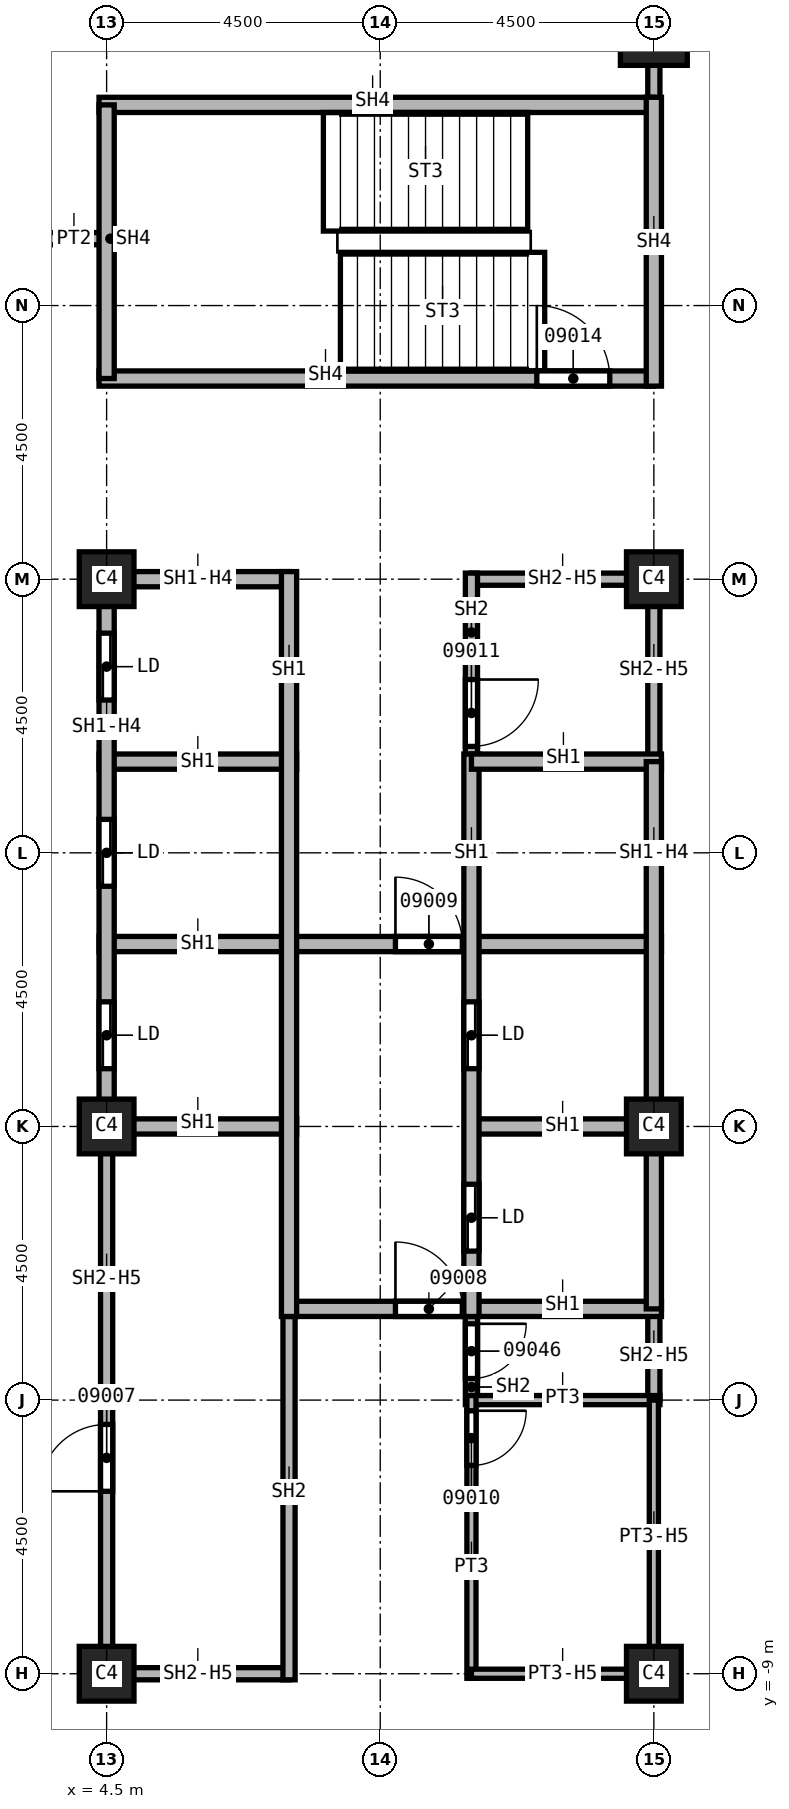
"""IFC4 building model, lengths in metres.
Left out: names, types, materials, properties, quantities, classifications, styles, units other than length and angle.
Written with IfcOpenShell. Run it as: python <this file> out.ifc"""

import sys

from ifc_helpers import new_model, si_unit, direction, frame, frame_2d, origin, origin_2d, place, context, subcontext, project, spatial, rectangle, extrude, element, fill, save


model = new_model("IFC4")
c1 = context("Model", 3, precision=1e-05, world=origin(), true_north=direction((0.0, 1.0)))
c2 = subcontext(c1, "Body", "Model", "MODEL_VIEW")
j1 = project(units=[si_unit("LENGTHUNIT", "METRE"), si_unit("PLANEANGLEUNIT", "RADIAN")], contexts=[c1])
p1 = place(None, origin())
s1 = spatial("IfcSite", under=j1, at=p1, CompositionType="ELEMENT")
p2 = place(p1, origin())
s2 = spatial("IfcBuilding", under=s1, at=p2, CompositionType="ELEMENT")
p3 = place(p2, frame((0.0, 0.0, 166.0)))
s3 = spatial("IfcBuildingStorey", under=s2, at=p3, CompositionType="ELEMENT", Elevation=166.0)
p4 = place(p3, frame((13.5, 18.0, 0.0), z_axis=(0.0, 0.0, 1.0), x_axis=(1.0, 0.0, 0.0)))
e1 = element("IfcColumn", 1, at=p4, inside=s3, PredefinedType="COLUMN", context=c2, shape_type="SweptSolid", body=[
    extrude(rectangle(XDim=1.1, YDim=1.1, at=origin_2d()), origin(), (0.0, 0.0, 1.0), 3.7),
])
for number, where, z_axis, x_axis in (
    (2, (4.5, 0.0, 0.0), (0.0, 0.0, 1.0), (1.0, 0.0, 0.0)),
    (3, (4.5, 9.0, 0.0), (0.0, 0.0, 1.0), (1.0, 0.0, 0.0)),
    (4, (4.5, -9.0, 0.0), (0.0, 0.0, 1.0), (1.0, 0.0, 0.0)),
    (5, (13.5, 0.0, 0.0), (0.0, 0.0, 1.0), (1.0, 0.0, 0.0)),
    (6, (13.5, 9.0, 0.0), (0.0, 0.0, 1.0), (1.0, 0.0, 0.0)),
    (7, (13.5, -9.0, 0.0), (0.0, 0.0, 1.0), (1.0, 0.0, 0.0)),
):
    element("IfcColumn", number, at=place(p3, frame(where, z_axis=z_axis, x_axis=x_axis)), inside=s3, PredefinedType="COLUMN", context=c2, shape_type="SweptSolid", body=[
        extrude(rectangle(XDim=0.9, YDim=0.9, at=origin_2d()), origin(), (0.0, 0.0, 1.0), 3.7),
    ])
p5 = place(p3, frame((3.55, 14.6, 0.0), z_axis=(0.0, 0.0, 1.0), x_axis=(1.0, 0.0, 0.0)))
e8 = element("IfcWall", 8, at=p5, inside=s3, PredefinedType="PARTITIONING", context=c2, shape_type="SweptSolid", body=[
    extrude(rectangle(XDim=0.95, YDim=0.2, at=frame_2d((0.475, 0.0))), origin(), (0.0, 0.0, 1.0), 3.7),
])
p6 = place(p3, frame((13.5, 16.675, 0.0), z_axis=(0.0, 0.0, 1.0), x_axis=(0.0, 1.0, 0.0)))
e9 = element("IfcWall", 9, at=p6, inside=s3, PredefinedType="PARTITIONING", context=c2, shape_type="SweptSolid", body=[
    extrude(rectangle(XDim=6.375, YDim=0.2, at=frame_2d((3.188, 0.0))), origin(), (0.0, 0.0, 1.0), 3.7),
])
p7 = place(p6, frame((4.45, 0.0, 0.0)))
e10 = element("IfcOpeningElement", 10, at=p7, cuts=e9, PredefinedType="OPENING", context=c2, shape_type="SweptSolid", body=[
    extrude(rectangle(XDim=1.0, YDim=2.1, at=frame_2d((0.5, 1.05))), frame((0.0, 0.1, 0.0), z_axis=(0.0, -1.0, 0.0), x_axis=(1.0, 0.0, 0.0)), (0.0, 0.0, 1.0), 0.2),
])
p8 = place(p3, frame((4.5, -9.1, 0.0), z_axis=(0.0, 0.0, 1.0), x_axis=(0.0, 1.0, 0.0)))
e11 = element("IfcWall", 11, at=p8, inside=s3, PredefinedType="SOLIDWALL", context=c2, shape_type="SweptSolid", body=[
    extrude(rectangle(XDim=9.1, YDim=0.2, at=frame_2d((4.55, 0.0))), origin(), (0.0, 0.0, 1.0), 2.938),
])
p9 = place(p8, frame((3.1, 0.0, 0.0)))
e12 = element("IfcOpeningElement", 12, at=p9, cuts=e11, PredefinedType="OPENING", context=c2, shape_type="SweptSolid", body=[
    extrude(rectangle(XDim=1.1, YDim=2.1, at=frame_2d((0.55, 1.05))), frame((0.0, 0.1, 0.0), z_axis=(0.0, -1.0, 0.0), x_axis=(1.0, 0.0, 0.0)), (0.0, 0.0, 1.0), 0.2),
])
p10 = place(p3, frame((7.5, -9.0, 0.0), z_axis=(0.0, 0.0, 1.0), x_axis=(-1.0, 0.0, 0.0)))
e13 = element("IfcWall", 13, at=p10, inside=s3, PredefinedType="SOLIDWALL", context=c2, shape_type="SweptSolid", body=[
    extrude(rectangle(XDim=3.0, YDim=0.2, at=frame_2d((1.5, 0.0))), origin(), (0.0, 0.0, 1.0), 2.938),
])
p11 = place(p3, frame((7.5, -2.875, 0.0), z_axis=(0.0, 0.0, 1.0), x_axis=(0.0, -1.0, 0.0)))
e14 = element("IfcWall", 14, at=p11, inside=s3, PredefinedType="SOLIDWALL", context=c2, shape_type="SweptSolid", body=[
    extrude(rectangle(XDim=6.225, YDim=0.2, at=frame_2d((3.113, 0.0))), origin(), (0.0, 0.0, 1.0), 3.7),
])
p12 = place(p3, frame((10.5, -2.875, 0.0), z_axis=(0.0, 0.0, 1.0), x_axis=(0.0, -1.0, 0.0)))
e15 = element("IfcWall", 15, at=p12, inside=s3, PredefinedType="SOLIDWALL", context=c2, shape_type="SweptSolid", body=[
    extrude(rectangle(XDim=1.7, YDim=0.2, at=frame_2d((0.85, 0.0))), origin(), (0.0, 0.0, 1.0), 3.7),
])
p13 = place(p12, frame((0.37, 0.0, 0.0)))
e16 = element("IfcOpeningElement", 16, at=p13, cuts=e15, PredefinedType="OPENING", context=c2, shape_type="SweptSolid", body=[
    extrude(rectangle(XDim=0.9, YDim=2.1, at=frame_2d((0.45, 1.05))), frame((0.0, 0.1, 0.0), z_axis=(0.0, -1.0, 0.0), x_axis=(1.0, 0.0, 0.0)), (0.0, 0.0, 1.0), 0.2),
])
p14 = place(p3, frame((10.5, 9.0, 0.0), z_axis=(0.0, 0.0, 1.0), x_axis=(1.0, 0.0, 0.0)))
e17 = element("IfcWall", 17, at=p14, inside=s3, PredefinedType="SOLIDWALL", context=c2, shape_type="SweptSolid", body=[
    extrude(rectangle(XDim=3.0, YDim=0.2, at=frame_2d((1.5, 0.0))), origin(), (0.0, 0.0, 1.0), 2.938),
])
p15 = place(p3, frame((10.5, 9.1, 0.0), z_axis=(0.0, 0.0, 1.0), x_axis=(0.0, -1.0, 0.0)))
e18 = element("IfcWall", 18, at=p15, inside=s3, PredefinedType="SOLIDWALL", context=c2, shape_type="SweptSolid", body=[
    extrude(rectangle(XDim=3.225, YDim=0.2, at=frame_2d((1.613, 0.0))), origin(), (0.0, 0.0, 1.0), 3.7),
])
p16 = place(p15, frame((1.75, 0.0, 0.0)))
e19 = element("IfcOpeningElement", 19, at=p16, cuts=e18, PredefinedType="OPENING", context=c2, shape_type="SweptSolid", body=[
    extrude(rectangle(XDim=1.1, YDim=2.1, at=frame_2d((0.55, 1.05))), frame((0.0, 0.1, 0.0), z_axis=(0.0, -1.0, 0.0), x_axis=(1.0, 0.0, 0.0)), (0.0, 0.0, 1.0), 0.2),
])
p17 = place(p3, frame((13.5, -3.0, 0.0), z_axis=(0.0, 0.0, 1.0), x_axis=(0.0, -1.0, 0.0)))
e20 = element("IfcWall", 20, at=p17, inside=s3, PredefinedType="SOLIDWALL", context=c2, shape_type="SweptSolid", body=[
    extrude(rectangle(XDim=1.5, YDim=0.2, at=frame_2d((0.75, 0.0))), origin(), (0.0, 0.0, 1.0), 2.938),
])
p18 = place(p3, frame((13.5, 9.1, 0.0), z_axis=(0.0, 0.0, 1.0), x_axis=(0.0, -1.0, 0.0)))
e21 = element("IfcWall", 21, at=p18, inside=s3, PredefinedType="SOLIDWALL", context=c2, shape_type="SweptSolid", body=[
    extrude(rectangle(XDim=3.1, YDim=0.2, at=frame_2d((1.55, 0.0))), origin(), (0.0, 0.0, 1.0), 2.938),
])
p19 = place(p3, frame((4.375, 0.0, 0.0), z_axis=(0.0, 0.0, 1.0), x_axis=(1.0, 0.0, 0.0)))
e22 = element("IfcWall", 22, at=p19, inside=s3, PredefinedType="SOLIDWALL", context=c2, shape_type="SweptSolid", body=[
    extrude(rectangle(XDim=3.25, YDim=0.25, at=frame_2d((1.625, 0.0))), origin(), (0.0, 0.0, 1.0), 3.7),
])
p20 = place(p3, frame((4.375, 3.0, 0.0), z_axis=(0.0, 0.0, 1.0), x_axis=(1.0, 0.0, 0.0)))
e23 = element("IfcWall", 23, at=p20, inside=s3, PredefinedType="SOLIDWALL", context=c2, shape_type="SweptSolid", body=[
    extrude(rectangle(XDim=9.25, YDim=0.25, at=frame_2d((4.625, 0.0))), origin(), (0.0, 0.0, 1.0), 3.7),
])
p21 = place(p20, frame((4.875, 0.0, 0.0)))
e24 = element("IfcOpeningElement", 24, at=p21, cuts=e23, PredefinedType="OPENING", context=c2, shape_type="SweptSolid", body=[
    extrude(rectangle(XDim=1.1, YDim=2.1, at=frame_2d((0.55, 1.05))), frame((0.0, 0.125, 0.0), z_axis=(0.0, -1.0, 0.0), x_axis=(1.0, 0.0, 0.0)), (0.0, 0.0, 1.0), 0.25),
])
p22 = place(p3, frame((4.375, 6.0, 0.0), z_axis=(0.0, 0.0, 1.0), x_axis=(1.0, 0.0, 0.0)))
e25 = element("IfcWall", 25, at=p22, inside=s3, PredefinedType="SOLIDWALL", context=c2, shape_type="SweptSolid", body=[
    extrude(rectangle(XDim=3.25, YDim=0.25, at=frame_2d((1.625, 0.0))), origin(), (0.0, 0.0, 1.0), 3.7),
])
p23 = place(p3, frame((4.5, 0.0, 0.0), z_axis=(0.0, 0.0, 1.0), x_axis=(0.0, 1.0, 0.0)))
e26 = element("IfcWall", 26, at=p23, inside=s3, PredefinedType="SOLIDWALL", context=c2, shape_type="SweptSolid", body=[
    extrude(rectangle(XDim=9.125, YDim=0.25, at=frame_2d((4.562, 0.0))), origin(), (0.0, 0.0, 1.0), 2.938),
])
p24 = place(p23, frame((0.95, 0.0, 0.0)))
e27 = element("IfcOpeningElement", 27, at=p24, cuts=e26, PredefinedType="OPENING", context=c2, shape_type="SweptSolid", body=[
    extrude(rectangle(XDim=1.1, YDim=2.1, at=frame_2d((0.55, 1.05))), frame((0.0, 0.125, 0.0), z_axis=(0.0, -1.0, 0.0), x_axis=(1.0, 0.0, 0.0)), (0.0, 0.0, 1.0), 0.25),
])
p25 = place(p23, frame((3.95, 0.0, 0.0)))
e28 = element("IfcOpeningElement", 28, at=p25, cuts=e26, PredefinedType="OPENING", context=c2, shape_type="SweptSolid", body=[
    extrude(rectangle(XDim=1.1, YDim=2.1, at=frame_2d((0.55, 1.05))), frame((0.0, 0.125, 0.0), z_axis=(0.0, -1.0, 0.0), x_axis=(1.0, 0.0, 0.0)), (0.0, 0.0, 1.0), 0.25),
])
p26 = place(p23, frame((7.012, 0.0, 0.0)))
e29 = element("IfcOpeningElement", 29, at=p26, cuts=e26, PredefinedType="OPENING", context=c2, shape_type="SweptSolid", body=[
    extrude(rectangle(XDim=1.1, YDim=2.1, at=frame_2d((0.55, 1.05))), frame((0.0, 0.125, 0.0), z_axis=(0.0, -1.0, 0.0), x_axis=(1.0, 0.0, 0.0)), (0.0, 0.0, 1.0), 0.25),
])
p27 = place(p3, frame((4.5, 9.0, 0.0), z_axis=(0.0, 0.0, 1.0), x_axis=(1.0, 0.0, 0.0)))
e30 = element("IfcWall", 30, at=p27, inside=s3, PredefinedType="SOLIDWALL", context=c2, shape_type="SweptSolid", body=[
    extrude(rectangle(XDim=3.0, YDim=0.25, at=frame_2d((1.5, 0.0))), origin(), (0.0, 0.0, 1.0), 2.938),
])
p28 = place(p3, frame((7.5, -3.0, 0.0), z_axis=(0.0, 0.0, 1.0), x_axis=(1.0, 0.0, 0.0)))
e31 = element("IfcWall", 31, at=p28, inside=s3, PredefinedType="SOLIDWALL", context=c2, shape_type="SweptSolid", body=[
    extrude(rectangle(XDim=6.125, YDim=0.25, at=frame_2d((3.062, 0.0))), origin(), (0.0, 0.0, 1.0), 3.7),
])
p29 = place(p28, frame((1.75, 0.0, 0.0)))
e32 = element("IfcOpeningElement", 32, at=p29, cuts=e31, PredefinedType="OPENING", context=c2, shape_type="SweptSolid", body=[
    extrude(rectangle(XDim=1.1, YDim=2.1, at=frame_2d((0.55, 1.05))), frame((0.0, 0.125, 0.0), z_axis=(0.0, -1.0, 0.0), x_axis=(1.0, 0.0, 0.0)), (0.0, 0.0, 1.0), 0.25),
])
p30 = place(p3, frame((7.5, 9.125, 0.0), z_axis=(0.0, 0.0, 1.0), x_axis=(0.0, -1.0, 0.0)))
e33 = element("IfcWall", 33, at=p30, inside=s3, PredefinedType="SOLIDWALL", context=c2, shape_type="SweptSolid", body=[
    extrude(rectangle(XDim=12.25, YDim=0.25, at=frame_2d((6.125, 0.0))), origin(), (0.0, 0.0, 1.0), 3.7),
])
p31 = place(p3, frame((10.5, 0.0, 0.0), z_axis=(0.0, 0.0, 1.0), x_axis=(1.0, 0.0, 0.0)))
e34 = element("IfcWall", 34, at=p31, inside=s3, PredefinedType="SOLIDWALL", context=c2, shape_type="SweptSolid", body=[
    extrude(rectangle(XDim=3.125, YDim=0.25, at=frame_2d((1.562, 0.0))), origin(), (0.0, 0.0, 1.0), 3.7),
])
p32 = place(p3, frame((10.5, 6.125, 0.0), z_axis=(0.0, 0.0, 1.0), x_axis=(0.0, -1.0, 0.0)))
e35 = element("IfcWall", 35, at=p32, inside=s3, PredefinedType="SOLIDWALL", context=c2, shape_type="SweptSolid", body=[
    extrude(rectangle(XDim=9.25, YDim=0.25, at=frame_2d((4.625, 0.0))), origin(), (0.0, 0.0, 1.0), 3.7),
])
p33 = place(p32, frame((7.075, 0.0, 0.0)))
e36 = element("IfcOpeningElement", 36, at=p33, cuts=e35, PredefinedType="OPENING", context=c2, shape_type="SweptSolid", body=[
    extrude(rectangle(XDim=1.1, YDim=2.1, at=frame_2d((0.55, 1.05))), frame((0.0, 0.125, 0.0), z_axis=(0.0, -1.0, 0.0), x_axis=(1.0, 0.0, 0.0)), (0.0, 0.0, 1.0), 0.25),
])
p34 = place(p32, frame((4.075, 0.0, 0.0)))
e37 = element("IfcOpeningElement", 37, at=p34, cuts=e35, PredefinedType="OPENING", context=c2, shape_type="SweptSolid", body=[
    extrude(rectangle(XDim=1.1, YDim=2.1, at=frame_2d((0.55, 1.05))), frame((0.0, 0.125, 0.0), z_axis=(0.0, -1.0, 0.0), x_axis=(1.0, 0.0, 0.0)), (0.0, 0.0, 1.0), 0.25),
])
p35 = place(p3, frame((10.5, 6.0, 0.0), z_axis=(0.0, 0.0, 1.0), x_axis=(1.0, 0.0, 0.0)))
e38 = element("IfcWall", 38, at=p35, inside=s3, PredefinedType="SOLIDWALL", context=c2, shape_type="SweptSolid", body=[
    extrude(rectangle(XDim=3.125, YDim=0.25, at=frame_2d((1.562, 0.0))), origin(), (0.0, 0.0, 1.0), 3.7),
])
p36 = place(p3, frame((13.5, 6.0, 0.0), z_axis=(0.0, 0.0, 1.0), x_axis=(0.0, -1.0, 0.0)))
e39 = element("IfcWall", 39, at=p36, inside=s3, PredefinedType="SOLIDWALL", context=c2, shape_type="SweptSolid", body=[
    extrude(rectangle(XDim=9.0, YDim=0.25, at=frame_2d((4.5, 0.0))), origin(), (0.0, 0.0, 1.0), 2.938),
])
p37 = place(p3, frame((4.375, 12.3, 0.0), z_axis=(0.0, 0.0, 1.0), x_axis=(1.0, 0.0, 0.0)))
e40 = element("IfcWall", 40, at=p37, inside=s3, PredefinedType="SOLIDWALL", context=c2, shape_type="SweptSolid", body=[
    extrude(rectangle(XDim=9.125, YDim=0.25, at=frame_2d((4.562, 0.0))), origin(), (0.0, 0.0, 1.0), 3.7),
])
p38 = place(p37, frame((7.2, 0.0, 0.0)))
e41 = element("IfcOpeningElement", 41, at=p38, cuts=e40, PredefinedType="OPENING", context=c2, shape_type="SweptSolid", body=[
    extrude(rectangle(XDim=1.2, YDim=2.1, at=frame_2d((0.6, 1.05))), frame((0.0, 0.125, 0.0), z_axis=(0.0, -1.0, 0.0), x_axis=(1.0, 0.0, 0.0)), (0.0, 0.0, 1.0), 0.25),
])
p39 = place(p3, frame((4.375, 16.8, 0.0), z_axis=(0.0, 0.0, 1.0), x_axis=(1.0, 0.0, 0.0)))
e42 = element("IfcWall", 42, at=p39, inside=s3, PredefinedType="SOLIDWALL", context=c2, shape_type="SweptSolid", body=[
    extrude(rectangle(XDim=9.125, YDim=0.25, at=frame_2d((4.562, 0.0))), origin(), (0.0, 0.0, 1.0), 3.7),
])
p40 = place(p3, frame((4.5, 12.3, 0.0), z_axis=(0.0, 0.0, 1.0), x_axis=(0.0, 1.0, 0.0)))
e43 = element("IfcWall", 43, at=p40, inside=s3, PredefinedType="SOLIDWALL", context=c2, shape_type="SweptSolid", body=[
    extrude(rectangle(XDim=4.5, YDim=0.25, at=frame_2d((2.25, 0.0))), origin(), (0.0, 0.0, 1.0), 3.7),
])
p41 = place(p3, frame((13.5, 12.175, 0.0), z_axis=(0.0, 0.0, 1.0), x_axis=(0.0, 1.0, 0.0)))
e44 = element("IfcWall", 44, at=p41, inside=s3, PredefinedType="SOLIDWALL", context=c2, shape_type="SweptSolid", body=[
    extrude(rectangle(XDim=4.75, YDim=0.25, at=frame_2d((2.375, 0.0))), origin(), (0.0, 0.0, 1.0), 3.7),
])
p42 = place(p3, frame((10.5, -4.5, 0.0), z_axis=(0.0, 0.0, 1.0), x_axis=(1.0, 0.0, 0.0)))
e45 = element("IfcWall", 45, at=p42, inside=s3, PredefinedType="PARTITIONING", context=c2, shape_type="SweptSolid", body=[
    extrude(rectangle(XDim=3.1, YDim=0.15, at=frame_2d((1.55, 0.0))), origin(), (0.0, 0.0, 1.0), 3.7),
])
p43 = place(p3, frame((10.5, -4.425, 0.0), z_axis=(0.0, 0.0, 1.0), x_axis=(0.0, -1.0, 0.0)))
e46 = element("IfcWall", 46, at=p43, inside=s3, PredefinedType="PARTITIONING", context=c2, shape_type="SweptSolid", body=[
    extrude(rectangle(XDim=4.65, YDim=0.15, at=frame_2d((2.325, 0.0))), origin(), (0.0, 0.0, 1.0), 3.7),
])
p44 = place(p43, frame((0.25, 0.0, 0.0)))
e47 = element("IfcOpeningElement", 47, at=p44, cuts=e46, PredefinedType="OPENING", context=c2, shape_type="SweptSolid", body=[
    extrude(rectangle(XDim=0.9, YDim=2.1, at=frame_2d((0.45, 1.05))), frame((0.0, 0.075, 0.0), z_axis=(0.0, -1.0, 0.0), x_axis=(1.0, 0.0, 0.0)), (0.0, 0.0, 1.0), 0.15),
])
p45 = place(p3, frame((13.5, -9.0, 0.0), z_axis=(0.0, 0.0, 1.0), x_axis=(-1.0, 0.0, 0.0)))
e48 = element("IfcWall", 48, at=p45, inside=s3, PredefinedType="PARTITIONING", context=c2, shape_type="SweptSolid", body=[
    extrude(rectangle(XDim=3.0, YDim=0.15, at=frame_2d((1.5, 0.0))), origin(), (0.0, 0.0, 1.0), 2.938),
])
p46 = place(p3, frame((13.5, -4.5, 0.0), z_axis=(0.0, 0.0, 1.0), x_axis=(0.0, -1.0, 0.0)))
e49 = element("IfcWall", 49, at=p46, inside=s3, PredefinedType="PARTITIONING", context=c2, shape_type="SweptSolid", body=[
    extrude(rectangle(XDim=4.575, YDim=0.15, at=frame_2d((2.288, 0.0))), origin(), (0.0, 0.0, 1.0), 2.938),
])
p47 = place(p9, origin())
e50 = element("IfcDoor", 50, at=p47, inside=s3, OperationType="SINGLE_SWING_RIGHT", PredefinedType="DOOR", context=c2, shape_type="SweptSolid", body=[
    extrude(rectangle(XDim=1.1, YDim=2.1, at=frame_2d((0.55, 1.05))), frame((0.0, 0.025, 0.0), z_axis=(0.0, -1.0, 0.0), x_axis=(1.0, 0.0, 0.0)), (0.0, 0.0, 1.0), 0.05),
])
fill(e12, e50)
p48 = place(p29, origin())
e51 = element("IfcDoor", 51, at=p48, inside=s3, OperationType="SINGLE_SWING_LEFT", PredefinedType="DOOR", context=c2, shape_type="SweptSolid", body=[
    extrude(rectangle(XDim=1.1, YDim=2.1, at=frame_2d((0.55, 1.05))), frame((0.0, 0.025, 0.0), z_axis=(0.0, -1.0, 0.0), x_axis=(1.0, 0.0, 0.0)), (0.0, 0.0, 1.0), 0.05),
])
fill(e32, e51)
p49 = place(p21, origin())
e52 = element("IfcDoor", 52, at=p49, inside=s3, OperationType="SINGLE_SWING_RIGHT", PredefinedType="DOOR", context=c2, shape_type="SweptSolid", body=[
    extrude(rectangle(XDim=1.1, YDim=2.1, at=frame_2d((0.55, 1.05))), frame((0.0, 0.025, 0.0), z_axis=(0.0, -1.0, 0.0), x_axis=(1.0, 0.0, 0.0)), (0.0, 0.0, 1.0), 0.05),
])
fill(e24, e52)
p50 = place(p44, origin())
e53 = element("IfcDoor", 53, at=p50, inside=s3, OperationType="SINGLE_SWING_LEFT", PredefinedType="DOOR", context=c2, shape_type="SweptSolid", body=[
    extrude(rectangle(XDim=0.9, YDim=2.1, at=frame_2d((0.45, 1.05))), frame((0.0, 0.025, 0.0), z_axis=(0.0, -1.0, 0.0), x_axis=(1.0, 0.0, 0.0)), (0.0, 0.0, 1.0), 0.05),
])
fill(e47, e53)
p51 = place(p16, origin())
e54 = element("IfcDoor", 54, at=p51, inside=s3, OperationType="SINGLE_SWING_RIGHT", PredefinedType="DOOR", context=c2, shape_type="SweptSolid", body=[
    extrude(rectangle(XDim=1.1, YDim=2.1, at=frame_2d((0.55, 1.05))), frame((0.0, 0.025, 0.0), z_axis=(0.0, -1.0, 0.0), x_axis=(1.0, 0.0, 0.0)), (0.0, 0.0, 1.0), 0.05),
])
fill(e19, e54)
p52 = place(p38, origin())
e55 = element("IfcDoor", 55, at=p52, inside=s3, OperationType="SINGLE_SWING_LEFT", PredefinedType="DOOR", context=c2, shape_type="SweptSolid", body=[
    extrude(rectangle(XDim=1.2, YDim=2.1, at=frame_2d((0.6, 1.05))), frame((0.0, 0.025, 0.0), z_axis=(0.0, -1.0, 0.0), x_axis=(1.0, 0.0, 0.0)), (0.0, 0.0, 1.0), 0.05),
])
fill(e41, e55)
p53 = place(p13, origin())
e56 = element("IfcDoor", 56, at=p53, inside=s3, OperationType="SINGLE_SWING_LEFT", PredefinedType="DOOR", context=c2, shape_type="SweptSolid", body=[
    extrude(rectangle(XDim=0.9, YDim=2.1, at=frame_2d((0.45, 1.05))), frame((0.0, 0.025, 0.0), z_axis=(0.0, -1.0, 0.0), x_axis=(1.0, 0.0, 0.0)), (0.0, 0.0, 1.0), 0.05),
])
fill(e16, e56)
p54 = place(p24, origin())
e57 = element("IfcDoor", 57, at=p54, inside=s3, OperationType="SLIDING_TO_LEFT", PredefinedType="DOOR", context=c2, shape_type="SweptSolid", body=[
    extrude(rectangle(XDim=1.1, YDim=2.1, at=frame_2d((0.55, 1.05))), frame((0.0, 0.025, 0.0), z_axis=(0.0, -1.0, 0.0), x_axis=(1.0, 0.0, 0.0)), (0.0, 0.0, 1.0), 0.05),
])
fill(e27, e57)
p55 = place(p25, origin())
e58 = element("IfcDoor", 58, at=p55, inside=s3, OperationType="SLIDING_TO_LEFT", PredefinedType="DOOR", context=c2, shape_type="SweptSolid", body=[
    extrude(rectangle(XDim=1.1, YDim=2.1, at=frame_2d((0.55, 1.05))), frame((0.0, 0.025, 0.0), z_axis=(0.0, -1.0, 0.0), x_axis=(1.0, 0.0, 0.0)), (0.0, 0.0, 1.0), 0.05),
])
fill(e28, e58)
p56 = place(p26, origin())
e59 = element("IfcDoor", 59, at=p56, inside=s3, OperationType="SLIDING_TO_LEFT", PredefinedType="DOOR", context=c2, shape_type="SweptSolid", body=[
    extrude(rectangle(XDim=1.1, YDim=2.1, at=frame_2d((0.55, 1.05))), frame((0.0, 0.025, 0.0), z_axis=(0.0, -1.0, 0.0), x_axis=(1.0, 0.0, 0.0)), (0.0, 0.0, 1.0), 0.05),
])
fill(e29, e59)
p57 = place(p33, origin())
e60 = element("IfcDoor", 60, at=p57, inside=s3, OperationType="SLIDING_TO_LEFT", PredefinedType="DOOR", context=c2, shape_type="SweptSolid", body=[
    extrude(rectangle(XDim=1.1, YDim=2.1, at=frame_2d((0.55, 1.05))), frame((0.0, 0.025, 0.0), z_axis=(0.0, -1.0, 0.0), x_axis=(1.0, 0.0, 0.0)), (0.0, 0.0, 1.0), 0.05),
])
fill(e36, e60)
p58 = place(p34, origin())
e61 = element("IfcDoor", 61, at=p58, inside=s3, OperationType="SLIDING_TO_LEFT", PredefinedType="DOOR", context=c2, shape_type="SweptSolid", body=[
    extrude(rectangle(XDim=1.1, YDim=2.1, at=frame_2d((0.55, 1.05))), frame((0.0, 0.025, 0.0), z_axis=(0.0, -1.0, 0.0), x_axis=(1.0, 0.0, 0.0)), (0.0, 0.0, 1.0), 0.05),
])
fill(e37, e61)
save(model, sys.argv[1])
